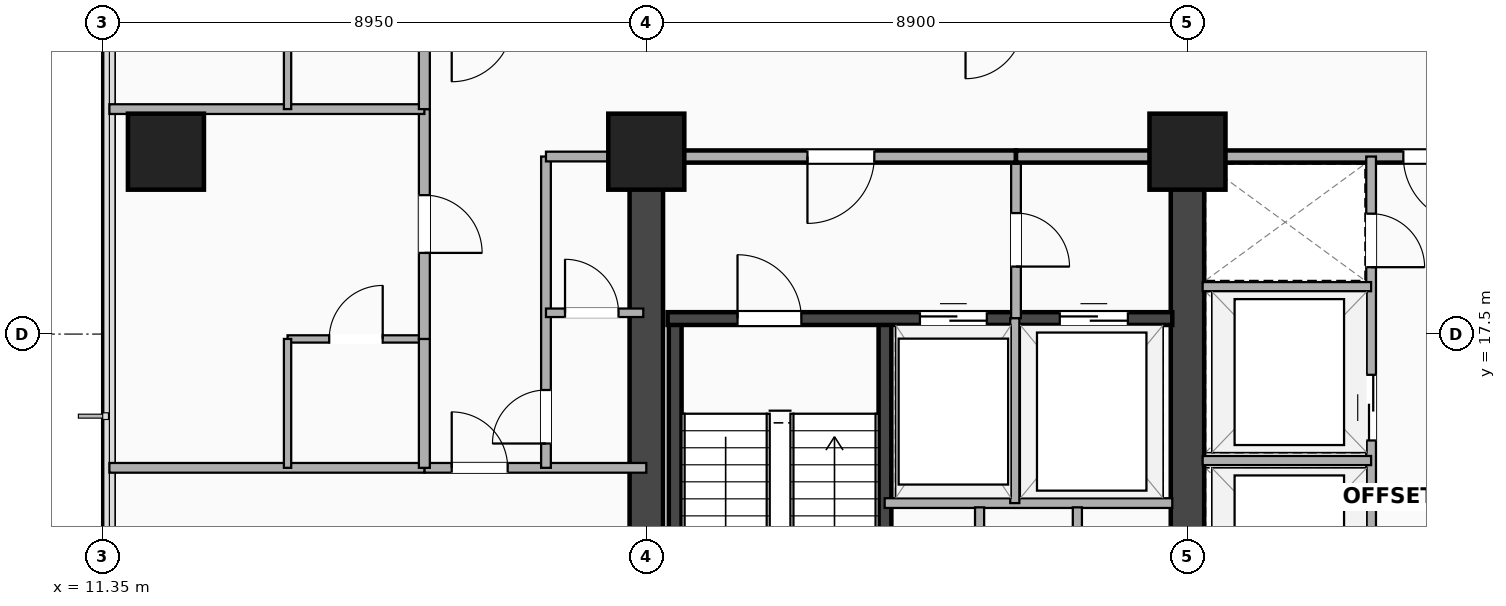
"""IFC4 building model, lengths in metres.
Left out: names, types, materials, properties, quantities, classifications, styles, units other than length and angle.
Written with IfcOpenShell. Run it as: python <this file> out.ifc"""

import sys

from ifc_helpers import new_model, si_unit, direction, frame, frame_2d, origin, origin_2d, place, context, subcontext, project, spatial, rectangle, extrude, element, fill, save


model = new_model("IFC4")
c1 = context("Model", 3, precision=1e-05, world=origin(), true_north=direction((0.0, 1.0)))
c2 = subcontext(c1, "Body", "Model", "MODEL_VIEW")
j1 = project(units=[si_unit("LENGTHUNIT", "METRE"), si_unit("PLANEANGLEUNIT", "RADIAN")], contexts=[c1])
p1 = place(None, origin())
s1 = spatial("IfcSite", under=j1, at=p1, CompositionType="ELEMENT")
p2 = place(p1, origin())
s2 = spatial("IfcBuilding", under=s1, at=p2, CompositionType="ELEMENT")
p3 = place(p2, frame((0.0, 0.0, 98.7)))
s3 = spatial("IfcBuildingStorey", under=s2, at=p3, CompositionType="ELEMENT", Elevation=98.7)
p4 = place(p3, frame((20.3, 3.5, 0.0), z_axis=(0.0, 0.0, 1.0), x_axis=(0.0, 1.0, 0.0)))
e1 = element("IfcWall", 1, at=p4, inside=s3, PredefinedType="SHEAR", context=c2, shape_type="SweptSolid", body=[
    extrude(rectangle(XDim=16.9, YDim=0.55, at=frame_2d((8.45, 0.0))), origin(), (0.0, 0.0, 1.0), 3.24),
])
p5 = place(p3, frame((29.2, 3.5, 0.0), z_axis=(0.0, 0.0, 1.0), x_axis=(0.0, 1.0, 0.0)))
e2 = element("IfcWall", 2, at=p5, inside=s3, PredefinedType="SHEAR", context=c2, shape_type="SweptSolid", body=[
    extrude(rectangle(XDim=16.9, YDim=0.55, at=frame_2d((8.45, 0.0))), origin(), (0.0, 0.0, 1.0), 3.24),
])
p6 = place(p5, frame((7.75, 0.0, 0.0), z_axis=(0.0, 0.0, 1.0), x_axis=(-1.0, 0.0, 0.0)))
e3 = element("IfcOpeningElement", 3, at=p6, cuts=e2, PredefinedType="OPENING", context=c2, shape_type="SweptSolid", body=[
    extrude(rectangle(XDim=1.1, YDim=2.15, at=frame_2d((0.55, 1.075))), frame((0.0, 0.285, 0.0), z_axis=(0.0, -1.0, 0.0), x_axis=(1.0, 0.0, 0.0)), (0.0, 0.0, 1.0), 0.57),
])
for number, where, z_axis, x_axis in (
    (4, (20.775, 9.745, 0.0), (0.0, 0.0, 1.0), (0.0, 1.0, 0.0)),
    (5, (24.225, 9.745, 0.0), (0.0, 0.0, 1.0), (0.0, 1.0, 0.0)),
):
    element("IfcWall", number, at=place(p3, frame(where, z_axis=z_axis, x_axis=x_axis)), inside=s3, PredefinedType="SHEAR", context=c2, shape_type="SweptSolid", body=[
        extrude(rectangle(XDim=8.01, YDim=0.21, at=frame_2d((4.005, 0.0))), origin(), (0.0, 0.0, 1.0), 3.24),
    ])
p7 = place(p3, frame((20.65, 17.755, 0.0), z_axis=(0.0, 0.0, 1.0), x_axis=(1.0, 0.0, 0.0)))
e6 = element("IfcWall", 6, at=p7, inside=s3, PredefinedType="SHEAR", context=c2, shape_type="SweptSolid", body=[
    extrude(rectangle(XDim=8.3, YDim=0.21, at=frame_2d((4.15, 0.0))), origin(), (0.0, 0.0, 1.0), 3.24),
])
p8 = place(p7, frame((2.2, 0.0, 0.0), z_axis=(0.0, 0.0, 1.0), x_axis=(-1.0, 0.0, 0.0)))
e7 = element("IfcOpeningElement", 7, at=p8, cuts=e6, PredefinedType="OPENING", context=c2, shape_type="SweptSolid", body=[
    extrude(rectangle(XDim=1.05, YDim=2.15, at=frame_2d((0.525, 1.075))), frame((0.0, 0.115, 0.0), z_axis=(0.0, -1.0, 0.0), x_axis=(1.0, 0.0, 0.0)), (0.0, 0.0, 1.0), 0.23),
])
p9 = place(p7, frame((4.15, 0.0, 0.0)))
e8 = element("IfcOpeningElement", 8, at=p9, cuts=e6, PredefinedType="OPENING", context=c2, shape_type="SweptSolid", body=[
    extrude(rectangle(XDim=1.1, YDim=2.18, at=frame_2d((0.55, 1.09))), frame((0.0, 0.115, 0.0), z_axis=(0.0, -1.0, 0.0), x_axis=(1.0, 0.0, 0.0)), (0.0, 0.0, 1.0), 0.23),
])
p10 = place(p7, frame((6.45, 0.0, 0.0)))
e9 = element("IfcOpeningElement", 9, at=p10, cuts=e6, PredefinedType="OPENING", context=c2, shape_type="SweptSolid", body=[
    extrude(rectangle(XDim=1.12, YDim=2.2, at=frame_2d((0.56, 1.1))), frame((0.0, 0.115, 0.0), z_axis=(0.0, -1.0, 0.0), x_axis=(1.0, 0.0, 0.0)), (0.0, 0.0, 1.0), 0.23),
])
for number, where, z_axis, x_axis in (
    (10, (20.3, 20.5, -0.26), (0.0, 0.0, 1.0), (1.0, 0.0, 0.0)),
    (11, (29.2, 20.5, -0.26), (0.0, 0.0, 1.0), (1.0, 0.0, 0.0)),
    (12, (12.4, 20.5, -0.26), (0.0, 0.0, 1.0), (1.0, 0.0, 0.0)),
):
    element("IfcColumn", number, at=place(p3, frame(where, z_axis=z_axis, x_axis=x_axis)), inside=s3, PredefinedType="COLUMN", context=c2, shape_type="SweptSolid", body=[
        extrude(rectangle(XDim=1.25, YDim=1.25, at=origin_2d()), origin(), (0.0, 0.0, 1.0), 3.5),
    ])
p11 = place(p3, frame((26.38, 17.76, 0.0), z_axis=(0.0, 0.0, 1.0), x_axis=(0.0, 1.0, 0.0)))
e13 = element("IfcWall", 13, at=p11, inside=s3, PredefinedType="PARTITIONING", context=c2, shape_type="SweptSolid", body=[
    extrude(rectangle(XDim=2.66, YDim=0.16, at=frame_2d((1.33, 0.0))), origin(), (0.0, 0.0, 1.0), 2.614),
])
p12 = place(p11, frame((0.85, 0.0, 0.0)))
e14 = element("IfcOpeningElement", 14, at=p12, cuts=e13, PredefinedType="OPENING", context=c2, shape_type="SweptSolid", body=[
    extrude(rectangle(XDim=0.88, YDim=2.08, at=frame_2d((0.44, 1.04))), frame((0.0, 0.09, 0.0), z_axis=(0.0, -1.0, 0.0), x_axis=(1.0, 0.0, 0.0)), (0.0, 0.0, 1.0), 0.18),
])
p13 = place(p3, frame((24.22, 14.72, 0.0), z_axis=(0.0, 0.0, 1.0), x_axis=(1.0, 0.0, 0.0)))
e15 = element("IfcWall", 15, at=p13, inside=s3, PredefinedType="PARTITIONING", context=c2, shape_type="SweptSolid", body=[
    extrude(rectangle(XDim=4.73, YDim=0.16, at=frame_2d((2.365, 0.0))), origin(), (0.0, 0.0, 1.0), 3.24),
])
p14 = place(p3, frame((26.36, 14.72, 0.0), z_axis=(0.0, 0.0, 1.0), x_axis=(0.0, 1.0, 0.0)))
e16 = element("IfcWall", 16, at=p14, inside=s3, PredefinedType="PARTITIONING", context=c2, shape_type="SweptSolid", body=[
    extrude(rectangle(XDim=3.04, YDim=0.15, at=frame_2d((1.52, 0.0))), origin(), (0.0, 0.0, 1.0), 3.24),
])
p15 = place(p3, frame((20.65, 20.42, 0.0), z_axis=(0.0, 0.0, 1.0), x_axis=(1.0, 0.0, 0.0)))
e17 = element("IfcWall", 17, at=p15, inside=s3, PredefinedType="PARTITIONING", context=c2, shape_type="SweptSolid", body=[
    extrude(rectangle(XDim=5.73, YDim=0.2, at=frame_2d((2.865, 0.0))), origin(), (0.0, 0.0, 1.0), 2.313),
])
p16 = place(p15, frame((2.3, 0.0, 0.0)))
e18 = element("IfcOpeningElement", 18, at=p16, cuts=e17, PredefinedType="OPENING", context=c2, shape_type="SweptSolid", body=[
    extrude(rectangle(XDim=1.1, YDim=2.15, at=frame_2d((0.55, 1.075))), frame((0.0, 0.11, 0.0), z_axis=(0.0, -1.0, 0.0), x_axis=(1.0, 0.0, 0.0)), (0.0, 0.0, 1.0), 0.22),
])
p17 = place(p3, frame((26.38, 20.42, 0.0), z_axis=(0.0, 0.0, 1.0), x_axis=(1.0, 0.0, 0.0)))
e19 = element("IfcWall", 19, at=p17, inside=s3, PredefinedType="PARTITIONING", context=c2, shape_type="SweptSolid", body=[
    extrude(rectangle(XDim=2.82, YDim=0.2, at=frame_2d((1.41, 0.0))), origin(), (0.0, 0.0, 1.0), 2.313),
])
p18 = place(p3, frame((29.2, 20.42, 0.0), z_axis=(0.0, 0.0, 1.0), x_axis=(1.0, 0.0, 0.0)))
e20 = element("IfcWall", 20, at=p18, inside=s3, PredefinedType="PARTITIONING", context=c2, shape_type="SweptSolid", body=[
    extrude(rectangle(XDim=7.8, YDim=0.2, at=frame_2d((3.9, 0.0))), origin(), (0.0, 0.0, 1.0), 2.313),
])
p19 = place(p18, frame((3.55, 0.0, 0.0)))
e21 = element("IfcOpeningElement", 21, at=p19, cuts=e20, PredefinedType="OPENING", context=c2, shape_type="SweptSolid", body=[
    extrude(rectangle(XDim=1.1, YDim=2.15, at=frame_2d((0.55, 1.075))), frame((0.0, 0.11, 0.0), z_axis=(0.0, -1.0, 0.0), x_axis=(1.0, 0.0, 0.0)), (0.0, 0.0, 1.0), 0.22),
])
for number, where, z_axis, x_axis in (
    (22, (25.781, 11.72, 0.0), (0.0, 0.0, 1.0), (0.0, 1.0, 0.0)),
    (23, (27.389, 11.72, 0.0), (0.0, 0.0, 1.0), (0.0, 1.0, 0.0)),
):
    element("IfcWall", number, at=place(p3, frame(where, z_axis=z_axis, x_axis=x_axis)), inside=s3, PredefinedType="PARTITIONING", context=c2, shape_type="SweptSolid", body=[
        extrude(rectangle(XDim=2.93, YDim=0.15, at=frame_2d((1.465, 0.0))), origin(), (0.0, 0.0, 1.0), 3.24),
    ])
p20 = place(p3, frame((32.22, 12.5, 0.0), z_axis=(0.0, 0.0, 1.0), x_axis=(0.0, 1.0, 0.0)))
e24 = element("IfcWall", 24, at=p20, inside=s3, PredefinedType="PARTITIONING", context=c2, shape_type="SweptSolid", body=[
    extrude(rectangle(XDim=7.92, YDim=0.16, at=frame_2d((3.96, 0.0))), origin(), (0.0, 0.0, 1.0), 2.614),
])
p21 = place(p20, frame((1.43, 0.0, 0.0), z_axis=(0.0, 0.0, 1.0), x_axis=(-1.0, 0.0, 0.0)))
e25 = element("IfcOpeningElement", 25, at=p21, cuts=e24, PredefinedType="OPENING", context=c2, shape_type="SweptSolid", body=[
    extrude(rectangle(XDim=1.08, YDim=2.16, at=frame_2d((0.54, 1.08))), frame((0.0, 0.09, 0.0), z_axis=(0.0, -1.0, 0.0), x_axis=(1.0, 0.0, 0.0)), (0.0, 0.0, 1.0), 0.18),
])
p22 = place(p20, frame((4.33, 0.0, 0.0), z_axis=(0.0, 0.0, 1.0), x_axis=(-1.0, 0.0, 0.0)))
e26 = element("IfcOpeningElement", 26, at=p22, cuts=e24, PredefinedType="OPENING", context=c2, shape_type="SweptSolid", body=[
    extrude(rectangle(XDim=1.08, YDim=2.16, at=frame_2d((0.54, 1.08))), frame((0.0, 0.09, 0.0), z_axis=(0.0, -1.0, 0.0), x_axis=(1.0, 0.0, 0.0)), (0.0, 0.0, 1.0), 0.18),
])
p23 = place(p20, frame((6.1, 0.0, 0.0)))
e27 = element("IfcOpeningElement", 27, at=p23, cuts=e24, PredefinedType="OPENING", context=c2, shape_type="SweptSolid", body=[
    extrude(rectangle(XDim=0.88, YDim=2.08, at=frame_2d((0.44, 1.04))), frame((0.0, 0.09, 0.0), z_axis=(0.0, -1.0, 0.0), x_axis=(1.0, 0.0, 0.0)), (0.0, 0.0, 1.0), 0.18),
])
for number, where, z_axis, x_axis in (
    (28, (29.45, 15.42, 0.0), (0.0, 0.0, 1.0), (1.0, 0.0, 0.0)),
    (29, (29.45, 18.28, 0.0), (0.0, 0.0, 1.0), (1.0, 0.0, 0.0)),
):
    element("IfcWall", number, at=place(p3, frame(where, z_axis=z_axis, x_axis=x_axis)), inside=s3, PredefinedType="PARTITIONING", context=c2, shape_type="SweptSolid", body=[
        extrude(rectangle(XDim=2.77, YDim=0.15, at=frame_2d((1.385, 0.0))), origin(), (0.0, 0.0, 1.0), 3.24),
    ])
p24 = place(p3, frame((16.65, 15.3, 0.0), z_axis=(0.0, 0.0, 1.0), x_axis=(1.0, 0.0, 0.0)))
e30 = element("IfcWall", 30, at=p24, inside=s3, PredefinedType="PARTITIONING", context=c2, shape_type="SweptSolid", body=[
    extrude(rectangle(XDim=3.65, YDim=0.16, at=frame_2d((1.825, 0.0))), origin(), (0.0, 0.0, 1.0), 2.313),
])
p25 = place(p24, frame((1.37, 0.0, 0.0), z_axis=(0.0, 0.0, 1.0), x_axis=(-1.0, 0.0, 0.0)))
e31 = element("IfcOpeningElement", 31, at=p25, cuts=e30, PredefinedType="OPENING", context=c2, shape_type="SweptSolid", body=[
    extrude(rectangle(XDim=0.92, YDim=2.08, at=frame_2d((0.46, 1.04))), frame((0.0, 0.09, 0.0), z_axis=(0.0, -1.0, 0.0), x_axis=(1.0, 0.0, 0.0)), (0.0, 0.0, 1.0), 0.18),
])
p26 = place(p3, frame((18.65, 15.3, 0.0), z_axis=(0.0, 0.0, 1.0), x_axis=(0.0, 1.0, 0.0)))
e32 = element("IfcWall", 32, at=p26, inside=s3, PredefinedType="PARTITIONING", context=c2, shape_type="SweptSolid", body=[
    extrude(rectangle(XDim=5.12, YDim=0.16, at=frame_2d((2.56, 0.0))), origin(), (0.0, 0.0, 1.0), 2.313),
])
p27 = place(p26, frame((1.28, 0.0, 0.0), z_axis=(0.0, 0.0, 1.0), x_axis=(-1.0, 0.0, 0.0)))
e33 = element("IfcOpeningElement", 33, at=p27, cuts=e32, PredefinedType="OPENING", context=c2, shape_type="SweptSolid", body=[
    extrude(rectangle(XDim=0.88, YDim=2.08, at=frame_2d((0.44, 1.04))), frame((0.0, 0.09, 0.0), z_axis=(0.0, -1.0, 0.0), x_axis=(1.0, 0.0, 0.0)), (0.0, 0.0, 1.0), 0.18),
])
p28 = place(p3, frame((18.65, 20.42, 0.0), z_axis=(0.0, 0.0, 1.0), x_axis=(1.0, 0.0, 0.0)))
e34 = element("IfcWall", 34, at=p28, inside=s3, PredefinedType="PARTITIONING", context=c2, shape_type="SweptSolid", body=[
    extrude(rectangle(XDim=1.65, YDim=0.16, at=frame_2d((0.825, 0.0))), origin(), (0.0, 0.0, 1.0), 2.313),
])
p29 = place(p3, frame((11.47, 15.3, 0.0), z_axis=(0.0, 0.0, 1.0), x_axis=(1.0, 0.0, 0.0)))
e35 = element("IfcWall", 35, at=p29, inside=s3, PredefinedType="PARTITIONING", context=c2, shape_type="SweptSolid", body=[
    extrude(rectangle(XDim=5.18, YDim=0.16, at=frame_2d((2.59, 0.0))), origin(), (0.0, 0.0, 1.0), 2.603),
])
p30 = place(p3, frame((14.4, 17.42, 0.0), z_axis=(0.0, 0.0, 1.0), x_axis=(1.0, 0.0, 0.0)))
e36 = element("IfcWall", 36, at=p30, inside=s3, PredefinedType="PARTITIONING", context=c2, shape_type="SweptSolid", body=[
    extrude(rectangle(XDim=2.25, YDim=0.12, at=frame_2d((1.125, 0.0))), origin(), (0.0, 0.0, 1.0), 3.24),
])
p31 = place(p30, frame((1.565, 0.0, 0.0), z_axis=(0.0, 0.0, 1.0), x_axis=(-1.0, 0.0, 0.0)))
e37 = element("IfcOpeningElement", 37, at=p31, cuts=e36, PredefinedType="OPENING", context=c2, shape_type="SweptSolid", body=[
    extrude(rectangle(XDim=0.88, YDim=2.08, at=frame_2d((0.44, 1.04))), frame((0.0, 0.07, 0.0), z_axis=(0.0, -1.0, 0.0), x_axis=(1.0, 0.0, 0.0)), (0.0, 0.0, 1.0), 0.14),
])
p32 = place(p3, frame((14.4, 15.3, 0.0), z_axis=(0.0, 0.0, 1.0), x_axis=(0.0, 1.0, 0.0)))
e38 = element("IfcWall", 38, at=p32, inside=s3, PredefinedType="PARTITIONING", context=c2, shape_type="SweptSolid", body=[
    extrude(rectangle(XDim=2.12, YDim=0.12, at=frame_2d((1.06, 0.0))), origin(), (0.0, 0.0, 1.0), 2.922),
])
p33 = place(p3, frame((16.65, 15.3, 0.0), z_axis=(0.0, 0.0, 1.0), x_axis=(0.0, 1.0, 0.0)))
e39 = element("IfcWall", 39, at=p33, inside=s3, PredefinedType="PARTITIONING", context=c2, shape_type="SweptSolid", body=[
    extrude(rectangle(XDim=2.12, YDim=0.18, at=frame_2d((1.06, 0.0))), origin(), (0.0, 0.0, 1.0), 2.922),
])
p34 = place(p3, frame((16.65, 17.42, 0.0), z_axis=(0.0, 0.0, 1.0), x_axis=(0.0, 1.0, 0.0)))
e40 = element("IfcWall", 40, at=p34, inside=s3, PredefinedType="PARTITIONING", context=c2, shape_type="SweptSolid", body=[
    extrude(rectangle(XDim=3.78, YDim=0.18, at=frame_2d((1.89, 0.0))), origin(), (0.0, 0.0, 1.0), 2.313),
])
p35 = place(p34, frame((1.415, 0.0, 0.0)))
e41 = element("IfcOpeningElement", 41, at=p35, cuts=e40, PredefinedType="OPENING", context=c2, shape_type="SweptSolid", body=[
    extrude(rectangle(XDim=0.95, YDim=2.15, at=frame_2d((0.475, 1.075))), frame((0.0, 0.1, 0.0), z_axis=(0.0, -1.0, 0.0), x_axis=(1.0, 0.0, 0.0)), (0.0, 0.0, 1.0), 0.2),
])
p36 = place(p3, frame((11.47, 21.2, 0.0), z_axis=(0.0, 0.0, 1.0), x_axis=(1.0, 0.0, 0.0)))
e42 = element("IfcWall", 42, at=p36, inside=s3, PredefinedType="PARTITIONING", context=c2, shape_type="SweptSolid", body=[
    extrude(rectangle(XDim=5.18, YDim=0.16, at=frame_2d((2.59, 0.0))), origin(), (0.0, 0.0, 1.0), 2.603),
])
p37 = place(p3, frame((14.4, 21.2, 0.0), z_axis=(0.0, 0.0, 1.0), x_axis=(0.0, 1.0, 0.0)))
e43 = element("IfcWall", 43, at=p37, inside=s3, PredefinedType="PARTITIONING", context=c2, shape_type="SweptSolid", body=[
    extrude(rectangle(XDim=2.12, YDim=0.12, at=frame_2d((1.06, 0.0))), origin(), (0.0, 0.0, 1.0), 3.24),
])
p38 = place(p3, frame((16.65, 21.2, 0.0), z_axis=(0.0, 0.0, 1.0), x_axis=(0.0, 1.0, 0.0)))
e44 = element("IfcWall", 44, at=p38, inside=s3, PredefinedType="PARTITIONING", context=c2, shape_type="SweptSolid", body=[
    extrude(rectangle(XDim=2.12, YDim=0.18, at=frame_2d((1.06, 0.0))), origin(), (0.0, 0.0, 1.0), 3.24),
])
p39 = place(p3, frame((18.65, 17.85, 0.0), z_axis=(0.0, 0.0, 1.0), x_axis=(1.0, 0.0, 0.0)))
e45 = element("IfcWall", 45, at=p39, inside=s3, PredefinedType="PARTITIONING", context=c2, shape_type="SweptSolid", body=[
    extrude(rectangle(XDim=1.6, YDim=0.14, at=frame_2d((0.8, 0.0))), origin(), (0.0, 0.0, 1.0), 2.313),
])
p40 = place(p39, frame((1.193, 0.0, 0.0), z_axis=(0.0, 0.0, 1.0), x_axis=(-1.0, 0.0, 0.0)))
e46 = element("IfcOpeningElement", 46, at=p40, cuts=e45, PredefinedType="OPENING", context=c2, shape_type="SweptSolid", body=[
    extrude(rectangle(XDim=0.88, YDim=2.08, at=frame_2d((0.44, 1.04))), frame((0.0, 0.08, 0.0), z_axis=(0.0, -1.0, 0.0), x_axis=(1.0, 0.0, 0.0)), (0.0, 0.0, 1.0), 0.16),
])
p41 = place(p8, origin())
e47 = element("IfcDoor", 47, at=p41, inside=s3, OperationType="SINGLE_SWING_LEFT", PredefinedType="DOOR", context=c2, shape_type="SweptSolid", body=[
    extrude(rectangle(XDim=1.05, YDim=2.15, at=frame_2d((0.525, 1.075))), frame((0.0, 0.025, 0.0), z_axis=(0.0, -1.0, 0.0), x_axis=(1.0, 0.0, 0.0)), (0.0, 0.0, 1.0), 0.05),
])
fill(e7, e47)
p42 = place(p9, origin())
e48 = element("IfcDoor", 48, at=p42, inside=s3, OperationType="DOUBLE_DOOR_SLIDING", PredefinedType="DOOR", context=c2, shape_type="SweptSolid", body=[
    extrude(rectangle(XDim=1.1, YDim=2.18, at=frame_2d((0.55, 1.09))), frame((0.0, 0.025, 0.0), z_axis=(0.0, -1.0, 0.0), x_axis=(1.0, 0.0, 0.0)), (0.0, 0.0, 1.0), 0.05),
])
fill(e8, e48)
p43 = place(p10, origin())
e49 = element("IfcDoor", 49, at=p43, inside=s3, OperationType="DOUBLE_DOOR_SLIDING", PredefinedType="DOOR", context=c2, shape_type="SweptSolid", body=[
    extrude(rectangle(XDim=1.12, YDim=2.2, at=frame_2d((0.56, 1.1))), frame((0.0, 0.025, 0.0), z_axis=(0.0, -1.0, 0.0), x_axis=(1.0, 0.0, 0.0)), (0.0, 0.0, 1.0), 0.05),
])
fill(e9, e49)
p44 = place(p12, origin())
e50 = element("IfcDoor", 50, at=p44, inside=s3, OperationType="SINGLE_SWING_LEFT", PredefinedType="DOOR", context=c2, shape_type="SweptSolid", body=[
    extrude(rectangle(XDim=0.88, YDim=2.08, at=frame_2d((0.44, 1.04))), frame((0.0, 0.025, 0.0), z_axis=(0.0, -1.0, 0.0), x_axis=(1.0, 0.0, 0.0)), (0.0, 0.0, 1.0), 0.05),
])
fill(e14, e50)
p45 = place(p16, origin())
e51 = element("IfcDoor", 51, at=p45, inside=s3, OperationType="SINGLE_SWING_LEFT", PredefinedType="DOOR", context=c2, shape_type="SweptSolid", body=[
    extrude(rectangle(XDim=1.1, YDim=2.15, at=frame_2d((0.55, 1.075))), frame((0.0, 0.025, 0.0), z_axis=(0.0, -1.0, 0.0), x_axis=(1.0, 0.0, 0.0)), (0.0, 0.0, 1.0), 0.05),
])
fill(e18, e51)
p46 = place(p19, origin())
e52 = element("IfcDoor", 52, at=p46, inside=s3, OperationType="SINGLE_SWING_RIGHT", PredefinedType="DOOR", context=c2, shape_type="SweptSolid", body=[
    extrude(rectangle(XDim=1.1, YDim=2.15, at=frame_2d((0.55, 1.075))), frame((0.0, 0.025, 0.0), z_axis=(0.0, -1.0, 0.0), x_axis=(1.0, 0.0, 0.0)), (0.0, 0.0, 1.0), 0.05),
])
fill(e21, e52)
p47 = place(p22, origin())
e53 = element("IfcDoor", 53, at=p47, inside=s3, OperationType="DOUBLE_DOOR_SLIDING", PredefinedType="DOOR", context=c2, shape_type="SweptSolid", body=[
    extrude(rectangle(XDim=1.08, YDim=2.16, at=frame_2d((0.54, 1.08))), frame((0.0, 0.025, 0.0), z_axis=(0.0, -1.0, 0.0), x_axis=(1.0, 0.0, 0.0)), (0.0, 0.0, 1.0), 0.05),
])
fill(e26, e53)
p48 = place(p23, origin())
e54 = element("IfcDoor", 54, at=p48, inside=s3, OperationType="SINGLE_SWING_LEFT", PredefinedType="DOOR", context=c2, shape_type="SweptSolid", body=[
    extrude(rectangle(XDim=0.88, YDim=2.08, at=frame_2d((0.44, 1.04))), frame((0.0, 0.025, 0.0), z_axis=(0.0, -1.0, 0.0), x_axis=(1.0, 0.0, 0.0)), (0.0, 0.0, 1.0), 0.05),
])
fill(e27, e54)
p49 = place(p25, origin())
e55 = element("IfcDoor", 55, at=p49, inside=s3, OperationType="SINGLE_SWING_LEFT", PredefinedType="DOOR", context=c2, shape_type="SweptSolid", body=[
    extrude(rectangle(XDim=0.92, YDim=2.08, at=frame_2d((0.46, 1.04))), frame((0.0, 0.025, 0.0), z_axis=(0.0, -1.0, 0.0), x_axis=(1.0, 0.0, 0.0)), (0.0, 0.0, 1.0), 0.05),
])
fill(e31, e55)
p50 = place(p27, origin())
e56 = element("IfcDoor", 56, at=p50, inside=s3, OperationType="SINGLE_SWING_LEFT", PredefinedType="DOOR", context=c2, shape_type="SweptSolid", body=[
    extrude(rectangle(XDim=0.88, YDim=2.08, at=frame_2d((0.44, 1.04))), frame((0.0, 0.025, 0.0), z_axis=(0.0, -1.0, 0.0), x_axis=(1.0, 0.0, 0.0)), (0.0, 0.0, 1.0), 0.05),
])
fill(e33, e56)
p51 = place(p31, origin())
e57 = element("IfcDoor", 57, at=p51, inside=s3, OperationType="SINGLE_SWING_RIGHT", PredefinedType="DOOR", context=c2, shape_type="SweptSolid", body=[
    extrude(rectangle(XDim=0.88, YDim=2.08, at=frame_2d((0.44, 1.04))), frame((0.0, 0.025, 0.0), z_axis=(0.0, -1.0, 0.0), x_axis=(1.0, 0.0, 0.0)), (0.0, 0.0, 1.0), 0.05),
])
fill(e37, e57)
p52 = place(p35, origin())
e58 = element("IfcDoor", 58, at=p52, inside=s3, OperationType="SINGLE_SWING_LEFT", PredefinedType="DOOR", context=c2, shape_type="SweptSolid", body=[
    extrude(rectangle(XDim=0.95, YDim=2.15, at=frame_2d((0.475, 1.075))), frame((0.0, 0.025, 0.0), z_axis=(0.0, -1.0, 0.0), x_axis=(1.0, 0.0, 0.0)), (0.0, 0.0, 1.0), 0.05),
])
fill(e41, e58)
p53 = place(p40, origin())
e59 = element("IfcDoor", 59, at=p53, inside=s3, OperationType="SINGLE_SWING_LEFT", PredefinedType="DOOR", context=c2, shape_type="SweptSolid", body=[
    extrude(rectangle(XDim=0.88, YDim=2.08, at=frame_2d((0.44, 1.04))), frame((0.0, 0.025, 0.0), z_axis=(0.0, -1.0, 0.0), x_axis=(1.0, 0.0, 0.0)), (0.0, 0.0, 1.0), 0.05),
])
fill(e46, e59)
save(model, sys.argv[1])
